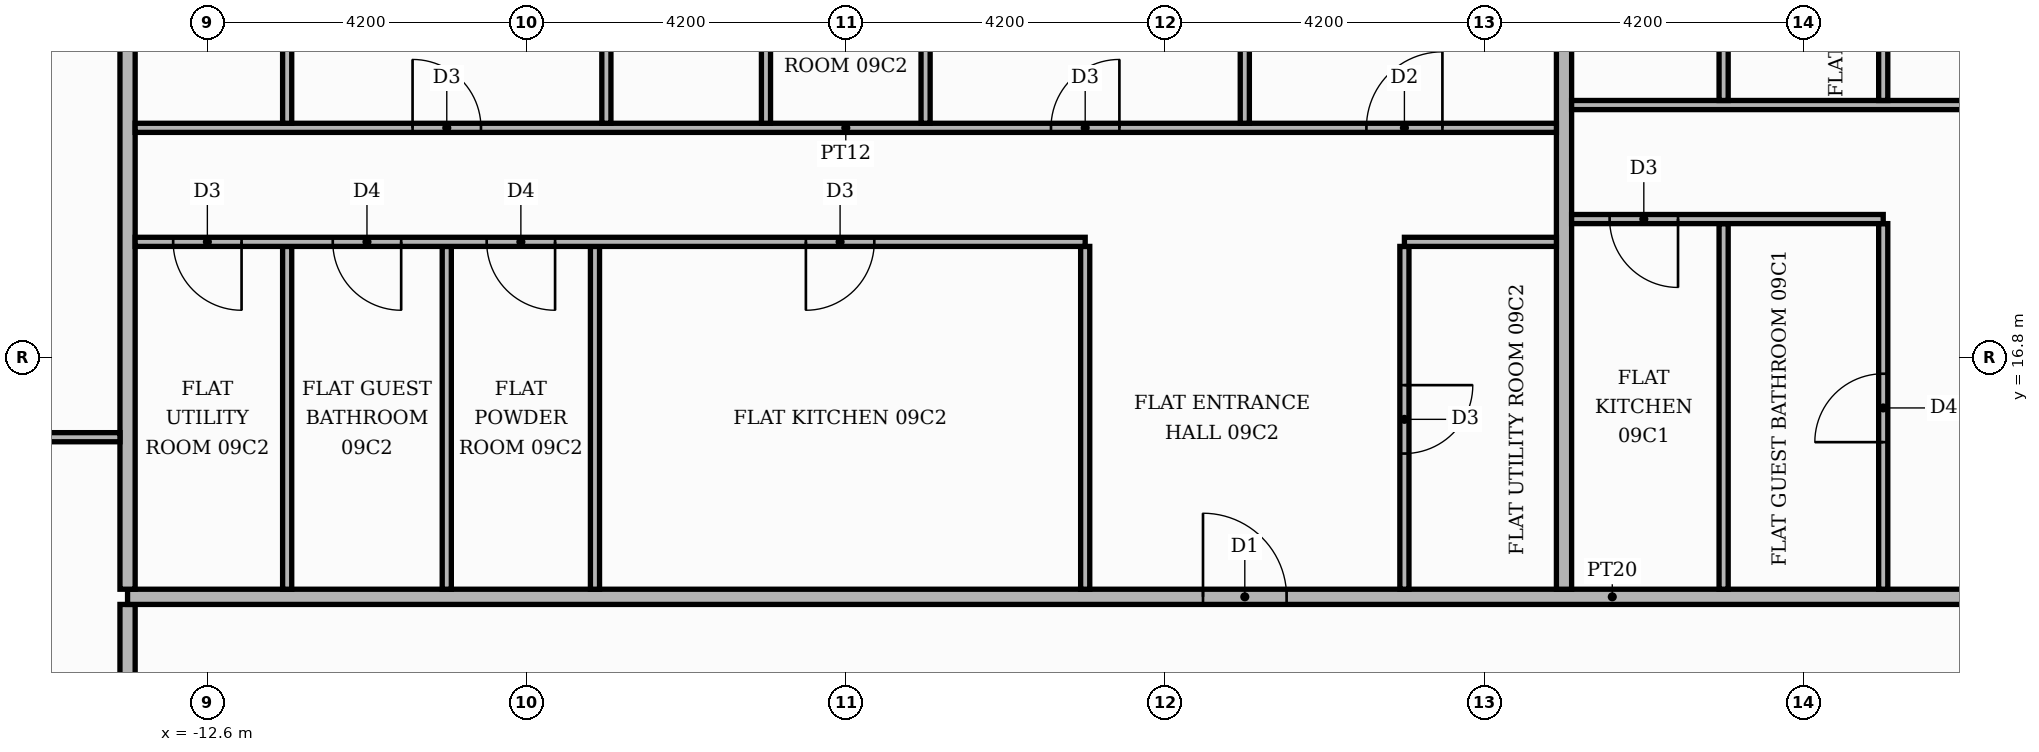
"""IFC4 building model, lengths in metres.
Left out: names, types, materials, properties, quantities, classifications, styles, units other than length and angle.
Written with IfcOpenShell. Run it as: python <this file> out.ifc"""

import sys

from ifc_helpers import new_model, si_unit, direction, frame, frame_2d, origin, place, context, subcontext, project, spatial, rectangle, extrude, element, fill, save


model = new_model("IFC4")
c1 = context("Model", 3, precision=1e-05, world=origin(), true_north=direction((0.0, 1.0)))
c2 = subcontext(c1, "Body", "Model", "MODEL_VIEW")
j1 = project(units=[si_unit("LENGTHUNIT", "METRE"), si_unit("PLANEANGLEUNIT", "RADIAN")], contexts=[c1])
p1 = place(None, origin())
s1 = spatial("IfcSite", under=j1, at=p1, CompositionType="ELEMENT")
p2 = place(p1, origin())
s2 = spatial("IfcBuilding", under=s1, at=p2, CompositionType="ELEMENT")
p3 = place(p2, frame((0.0, 0.0, 42.6)))
s3 = spatial("IfcBuildingStorey", under=s2, at=p3, CompositionType="ELEMENT", Elevation=42.6)
p4 = place(p3, frame((-13.65, -13.55, 0.0), z_axis=(0.0, 0.0, 1.0), x_axis=(0.0, 1.0, 0.0)))
e1 = element("IfcWall", 1, at=p4, inside=s3, PredefinedType="PARTITIONING", context=c2, shape_type="SweptSolid", body=[
    extrude(rectangle(XDim=27.1, YDim=0.2, at=frame_2d((13.55, 0.0))), origin(), (0.0, 0.0, 1.0), 3.48),
])
p5 = place(p4, frame((24.55, 0.0, 0.0)))
e2 = element("IfcOpeningElement", 2, at=p5, cuts=e1, PredefinedType="OPENING", context=c2, shape_type="SweptSolid", body=[
    extrude(rectangle(XDim=1.1, YDim=2.4, at=frame_2d((0.55, 1.2))), frame((0.0, 0.11, 0.0), z_axis=(0.0, -1.0, 0.0), x_axis=(1.0, 0.0, 0.0)), (0.0, 0.0, 1.0), 0.22),
])
p6 = place(p3, frame((-13.65, 13.65, 0.0), z_axis=(0.0, 0.0, 1.0), x_axis=(1.0, 0.0, 0.0)))
e3 = element("IfcWall", 3, at=p6, inside=s3, PredefinedType="PARTITIONING", context=c2, shape_type="SweptSolid", body=[
    extrude(rectangle(XDim=39.07, YDim=0.2, at=frame_2d((19.535, 0.0))), origin(), (0.0, 0.0, 1.0), 3.48),
])
p7 = place(p6, frame((24.65, 0.0, 0.0)))
e4 = element("IfcOpeningElement", 4, at=p7, cuts=e3, PredefinedType="OPENING", context=c2, shape_type="SweptSolid", body=[
    extrude(rectangle(XDim=1.1, YDim=2.4, at=frame_2d((0.55, 1.2))), frame((0.0, 0.11, 0.0), z_axis=(0.0, -1.0, 0.0), x_axis=(1.0, 0.0, 0.0)), (0.0, 0.0, 1.0), 0.22),
])
p8 = place(p6, frame((14.15, 0.0, 0.0)))
e5 = element("IfcOpeningElement", 5, at=p8, cuts=e3, PredefinedType="OPENING", context=c2, shape_type="SweptSolid", body=[
    extrude(rectangle(XDim=1.1, YDim=2.4, at=frame_2d((0.55, 1.2))), frame((0.0, 0.11, 0.0), z_axis=(0.0, -1.0, 0.0), x_axis=(1.0, 0.0, 0.0)), (0.0, 0.0, 1.0), 0.22),
])
p9 = place(p3, frame((-13.65, 13.75, 0.0), z_axis=(0.0, 0.0, 1.0), x_axis=(0.0, 1.0, 0.0)))
e6 = element("IfcWall", 6, at=p9, inside=s3, PredefinedType="PARTITIONING", context=c2, shape_type="SweptSolid", body=[
    extrude(rectangle(XDim=11.67, YDim=0.2, at=frame_2d((5.835, 0.0))), origin(), (0.0, 0.0, 1.0), 3.48),
])
for number, where, z_axis, x_axis in (
    (7, (-11.55, 13.75, 0.0), (0.0, 0.0, 1.0), (0.0, 1.0, 0.0)),
    (8, (-9.45, 13.75, 0.0), (0.0, 0.0, 1.0), (0.0, 1.0, 0.0)),
    (9, (-7.5, 13.75, 0.0), (0.0, 0.0, 1.0), (0.0, 1.0, 0.0)),
    (10, (-1.05, 13.75, 0.0), (0.0, 0.0, 1.0), (0.0, 1.0, 0.0)),
):
    element("IfcWall", number, at=place(p3, frame(where, z_axis=z_axis, x_axis=x_axis)), inside=s3, PredefinedType="PARTITIONING", context=c2, shape_type="SweptSolid", body=[
        extrude(rectangle(XDim=4.51, YDim=0.12, at=frame_2d((2.255, 0.0))), origin(), (0.0, 0.0, 1.0), 3.48),
    ])
p10 = place(p3, frame((3.15, 13.75, 0.0), z_axis=(0.0, 0.0, 1.0), x_axis=(0.0, 1.0, 0.0)))
e11 = element("IfcWall", 11, at=p10, inside=s3, PredefinedType="PARTITIONING", context=c2, shape_type="SweptSolid", body=[
    extrude(rectangle(XDim=4.51, YDim=0.12, at=frame_2d((2.255, 0.0))), origin(), (0.0, 0.0, 1.0), 3.48),
])
p11 = place(p10, frame((1.785, 0.0, 0.0)))
e12 = element("IfcOpeningElement", 12, at=p11, cuts=e11, PredefinedType="OPENING", context=c2, shape_type="SweptSolid", body=[
    extrude(rectangle(XDim=0.9, YDim=2.1, at=frame_2d((0.45, 1.05))), frame((0.0, 0.07, 0.0), z_axis=(0.0, -1.0, 0.0), x_axis=(1.0, 0.0, 0.0)), (0.0, 0.0, 1.0), 0.14),
])
p12 = place(p3, frame((5.25, 13.75, 0.0), z_axis=(0.0, 0.0, 1.0), x_axis=(0.0, 1.0, 0.0)))
e13 = element("IfcWall", 13, at=p12, inside=s3, PredefinedType="PARTITIONING", context=c2, shape_type="SweptSolid", body=[
    extrude(rectangle(XDim=11.67, YDim=0.2, at=frame_2d((5.835, 0.0))), origin(), (0.0, 0.0, 1.0), 3.48),
])
p13 = place(p3, frame((7.35, 13.75, 0.0), z_axis=(0.0, 0.0, 1.0), x_axis=(0.0, 1.0, 0.0)))
e14 = element("IfcWall", 14, at=p13, inside=s3, PredefinedType="PARTITIONING", context=c2, shape_type="SweptSolid", body=[
    extrude(rectangle(XDim=4.81, YDim=0.12, at=frame_2d((2.405, 0.0))), origin(), (0.0, 0.0, 1.0), 3.48),
])
p14 = place(p3, frame((9.45, 13.75, 0.0), z_axis=(0.0, 0.0, 1.0), x_axis=(0.0, 1.0, 0.0)))
e15 = element("IfcWall", 15, at=p14, inside=s3, PredefinedType="PARTITIONING", context=c2, shape_type="SweptSolid", body=[
    extrude(rectangle(XDim=4.81, YDim=0.12, at=frame_2d((2.405, 0.0))), origin(), (0.0, 0.0, 1.0), 3.48),
])
p15 = place(p14, frame((1.935, 0.0, 0.0)))
e16 = element("IfcOpeningElement", 16, at=p15, cuts=e15, PredefinedType="OPENING", context=c2, shape_type="SweptSolid", body=[
    extrude(rectangle(XDim=0.9, YDim=2.1, at=frame_2d((0.45, 1.05))), frame((0.0, 0.07, 0.0), z_axis=(0.0, -1.0, 0.0), x_axis=(1.0, 0.0, 0.0)), (0.0, 0.0, 1.0), 0.14),
])
p16 = place(p3, frame((-20.72, 15.75, 0.0), z_axis=(0.0, 0.0, 1.0), x_axis=(1.0, 0.0, 0.0)))
e17 = element("IfcWall", 17, at=p16, inside=s3, PredefinedType="PARTITIONING", context=c2, shape_type="SweptSolid", body=[
    extrude(rectangle(XDim=6.97, YDim=0.12, at=frame_2d((3.485, 0.0))), origin(), (0.0, 0.0, 1.0), 3.48),
])
p17 = place(p16, frame((3.085, 0.0, 0.0)))
e18 = element("IfcOpeningElement", 18, at=p17, cuts=e17, PredefinedType="OPENING", context=c2, shape_type="SweptSolid", body=[
    extrude(rectangle(XDim=0.9, YDim=2.1, at=frame_2d((0.45, 1.05))), frame((0.0, 0.07, 0.0), z_axis=(0.0, -1.0, 0.0), x_axis=(1.0, 0.0, 0.0)), (0.0, 0.0, 1.0), 0.14),
])
p18 = place(p3, frame((-13.55, 18.32, 0.0), z_axis=(0.0, 0.0, 1.0), x_axis=(1.0, 0.0, 0.0)))
e19 = element("IfcWall", 19, at=p18, inside=s3, PredefinedType="PARTITIONING", context=c2, shape_type="SweptSolid", body=[
    extrude(rectangle(XDim=12.5, YDim=0.12, at=frame_2d((6.25, 0.0))), origin(), (0.0, 0.0, 1.0), 3.48),
])
p19 = place(p18, frame((8.825, 0.0, 0.0)))
e20 = element("IfcOpeningElement", 20, at=p19, cuts=e19, PredefinedType="OPENING", context=c2, shape_type="SweptSolid", body=[
    extrude(rectangle(XDim=0.9, YDim=2.1, at=frame_2d((0.45, 1.05))), frame((0.0, 0.07, 0.0), z_axis=(0.0, -1.0, 0.0), x_axis=(1.0, 0.0, 0.0)), (0.0, 0.0, 1.0), 0.14),
])
p20 = place(p18, frame((4.625, 0.0, 0.0)))
e21 = element("IfcOpeningElement", 21, at=p20, cuts=e19, PredefinedType="OPENING", context=c2, shape_type="SweptSolid", body=[
    extrude(rectangle(XDim=0.9, YDim=2.1, at=frame_2d((0.45, 1.05))), frame((0.0, 0.07, 0.0), z_axis=(0.0, -1.0, 0.0), x_axis=(1.0, 0.0, 0.0)), (0.0, 0.0, 1.0), 0.14),
])
p21 = place(p18, frame((2.6, 0.0, 0.0)))
e22 = element("IfcOpeningElement", 22, at=p21, cuts=e19, PredefinedType="OPENING", context=c2, shape_type="SweptSolid", body=[
    extrude(rectangle(XDim=0.9, YDim=2.1, at=frame_2d((0.45, 1.05))), frame((0.0, 0.07, 0.0), z_axis=(0.0, -1.0, 0.0), x_axis=(1.0, 0.0, 0.0)), (0.0, 0.0, 1.0), 0.14),
])
p22 = place(p18, frame((0.5, 0.0, 0.0)))
e23 = element("IfcOpeningElement", 23, at=p22, cuts=e19, PredefinedType="OPENING", context=c2, shape_type="SweptSolid", body=[
    extrude(rectangle(XDim=0.9, YDim=2.1, at=frame_2d((0.45, 1.05))), frame((0.0, 0.07, 0.0), z_axis=(0.0, -1.0, 0.0), x_axis=(1.0, 0.0, 0.0)), (0.0, 0.0, 1.0), 0.14),
])
p23 = place(p3, frame((3.15, 18.32, 0.0), z_axis=(0.0, 0.0, 1.0), x_axis=(1.0, 0.0, 0.0)))
e24 = element("IfcWall", 24, at=p23, inside=s3, PredefinedType="PARTITIONING", context=c2, shape_type="SweptSolid", body=[
    extrude(rectangle(XDim=2.0, YDim=0.12, at=frame_2d((1.0, 0.0))), origin(), (0.0, 0.0, 1.0), 3.48),
])
p24 = place(p3, frame((5.35, 18.62, 0.0), z_axis=(0.0, 0.0, 1.0), x_axis=(1.0, 0.0, 0.0)))
e25 = element("IfcWall", 25, at=p24, inside=s3, PredefinedType="PARTITIONING", context=c2, shape_type="SweptSolid", body=[
    extrude(rectangle(XDim=4.1, YDim=0.12, at=frame_2d((2.05, 0.0))), origin(), (0.0, 0.0, 1.0), 3.48),
])
p25 = place(p24, frame((0.5, 0.0, 0.0)))
e26 = element("IfcOpeningElement", 26, at=p25, cuts=e25, PredefinedType="OPENING", context=c2, shape_type="SweptSolid", body=[
    extrude(rectangle(XDim=0.9, YDim=2.1, at=frame_2d((0.45, 1.05))), frame((0.0, 0.07, 0.0), z_axis=(0.0, -1.0, 0.0), x_axis=(1.0, 0.0, 0.0)), (0.0, 0.0, 1.0), 0.14),
])
p26 = place(p3, frame((-13.55, 19.82, 0.0), z_axis=(0.0, 0.0, 1.0), x_axis=(1.0, 0.0, 0.0)))
e27 = element("IfcWall", 27, at=p26, inside=s3, PredefinedType="PARTITIONING", context=c2, shape_type="SweptSolid", body=[
    extrude(rectangle(XDim=18.7, YDim=0.12, at=frame_2d((9.35, 0.0))), origin(), (0.0, 0.0, 1.0), 3.48),
])
p27 = place(p26, frame((16.2, 0.0, 0.0)))
e28 = element("IfcOpeningElement", 28, at=p27, cuts=e27, PredefinedType="OPENING", context=c2, shape_type="SweptSolid", body=[
    extrude(rectangle(XDim=1.0, YDim=2.1, at=frame_2d((0.5, 1.05))), frame((0.0, 0.07, 0.0), z_axis=(0.0, -1.0, 0.0), x_axis=(1.0, 0.0, 0.0)), (0.0, 0.0, 1.0), 0.14),
])
p28 = place(p26, frame((12.05, 0.0, 0.0)))
e29 = element("IfcOpeningElement", 29, at=p28, cuts=e27, PredefinedType="OPENING", context=c2, shape_type="SweptSolid", body=[
    extrude(rectangle(XDim=0.9, YDim=2.1, at=frame_2d((0.45, 1.05))), frame((0.0, 0.07, 0.0), z_axis=(0.0, -1.0, 0.0), x_axis=(1.0, 0.0, 0.0)), (0.0, 0.0, 1.0), 0.14),
])
p29 = place(p26, frame((3.65, 0.0, 0.0)))
e30 = element("IfcOpeningElement", 30, at=p29, cuts=e27, PredefinedType="OPENING", context=c2, shape_type="SweptSolid", body=[
    extrude(rectangle(XDim=0.9, YDim=2.1, at=frame_2d((0.45, 1.05))), frame((0.0, 0.07, 0.0), z_axis=(0.0, -1.0, 0.0), x_axis=(1.0, 0.0, 0.0)), (0.0, 0.0, 1.0), 0.14),
])
p30 = place(p3, frame((-11.55, 19.88, 0.0), z_axis=(0.0, 0.0, 1.0), x_axis=(0.0, 1.0, 0.0)))
e31 = element("IfcWall", 31, at=p30, inside=s3, PredefinedType="PARTITIONING", context=c2, shape_type="SweptSolid", body=[
    extrude(rectangle(XDim=5.54, YDim=0.12, at=frame_2d((2.77, 0.0))), origin(), (0.0, 0.0, 1.0), 3.48),
])
p31 = place(p30, frame((2.44, 0.0, 0.0)))
e32 = element("IfcOpeningElement", 32, at=p31, cuts=e31, PredefinedType="OPENING", context=c2, shape_type="SweptSolid", body=[
    extrude(rectangle(XDim=0.9, YDim=2.1, at=frame_2d((0.45, 1.05))), frame((0.0, 0.07, 0.0), z_axis=(0.0, -1.0, 0.0), x_axis=(1.0, 0.0, 0.0)), (0.0, 0.0, 1.0), 0.14),
])
p32 = place(p3, frame((-7.35, 19.88, 0.0), z_axis=(0.0, 0.0, 1.0), x_axis=(0.0, 1.0, 0.0)))
e33 = element("IfcWall", 33, at=p32, inside=s3, PredefinedType="PARTITIONING", context=c2, shape_type="SweptSolid", body=[
    extrude(rectangle(XDim=5.54, YDim=0.12, at=frame_2d((2.77, 0.0))), origin(), (0.0, 0.0, 1.0), 3.48),
])
p33 = place(p3, frame((-5.25, 19.88, 0.0), z_axis=(0.0, 0.0, 1.0), x_axis=(0.0, 1.0, 0.0)))
e34 = element("IfcWall", 34, at=p33, inside=s3, PredefinedType="PARTITIONING", context=c2, shape_type="SweptSolid", body=[
    extrude(rectangle(XDim=5.54, YDim=0.12, at=frame_2d((2.77, 0.0))), origin(), (0.0, 0.0, 1.0), 3.48),
])
p34 = place(p33, frame((2.44, 0.0, 0.0)))
e35 = element("IfcOpeningElement", 35, at=p34, cuts=e34, PredefinedType="OPENING", context=c2, shape_type="SweptSolid", body=[
    extrude(rectangle(XDim=0.9, YDim=2.1, at=frame_2d((0.45, 1.05))), frame((0.0, 0.07, 0.0), z_axis=(0.0, -1.0, 0.0), x_axis=(1.0, 0.0, 0.0)), (0.0, 0.0, 1.0), 0.14),
])
p35 = place(p3, frame((-3.15, 19.88, 0.0), z_axis=(0.0, 0.0, 1.0), x_axis=(0.0, 1.0, 0.0)))
e36 = element("IfcWall", 36, at=p35, inside=s3, PredefinedType="PARTITIONING", context=c2, shape_type="SweptSolid", body=[
    extrude(rectangle(XDim=5.54, YDim=0.12, at=frame_2d((2.77, 0.0))), origin(), (0.0, 0.0, 1.0), 3.48),
])
p36 = place(p35, frame((2.44, 0.0, 0.0)))
e37 = element("IfcOpeningElement", 37, at=p36, cuts=e36, PredefinedType="OPENING", context=c2, shape_type="SweptSolid", body=[
    extrude(rectangle(XDim=0.9, YDim=2.1, at=frame_2d((0.45, 1.05))), frame((0.0, 0.07, 0.0), z_axis=(0.0, -1.0, 0.0), x_axis=(1.0, 0.0, 0.0)), (0.0, 0.0, 1.0), 0.14),
])
p37 = place(p3, frame((1.05, 19.88, 0.0), z_axis=(0.0, 0.0, 1.0), x_axis=(0.0, 1.0, 0.0)))
e38 = element("IfcWall", 38, at=p37, inside=s3, PredefinedType="PARTITIONING", context=c2, shape_type="SweptSolid", body=[
    extrude(rectangle(XDim=5.54, YDim=0.12, at=frame_2d((2.77, 0.0))), origin(), (0.0, 0.0, 1.0), 3.48),
])
p38 = place(p3, frame((5.35, 20.12, 0.0), z_axis=(0.0, 0.0, 1.0), x_axis=(1.0, 0.0, 0.0)))
e39 = element("IfcWall", 39, at=p38, inside=s3, PredefinedType="PARTITIONING", context=c2, shape_type="SweptSolid", body=[
    extrude(rectangle(XDim=11.95, YDim=0.12, at=frame_2d((5.975, 0.0))), origin(), (0.0, 0.0, 1.0), 3.48),
])
p39 = place(p38, frame((8.85, 0.0, 0.0)))
e40 = element("IfcOpeningElement", 40, at=p39, cuts=e39, PredefinedType="OPENING", context=c2, shape_type="SweptSolid", body=[
    extrude(rectangle(XDim=1.0, YDim=2.1, at=frame_2d((0.5, 1.05))), frame((0.0, 0.07, 0.0), z_axis=(0.0, -1.0, 0.0), x_axis=(1.0, 0.0, 0.0)), (0.0, 0.0, 1.0), 0.14),
])
p40 = place(p38, frame((5.75, 0.0, 0.0)))
e41 = element("IfcOpeningElement", 41, at=p40, cuts=e39, PredefinedType="OPENING", context=c2, shape_type="SweptSolid", body=[
    extrude(rectangle(XDim=0.9, YDim=2.1, at=frame_2d((0.45, 1.05))), frame((0.0, 0.07, 0.0), z_axis=(0.0, -1.0, 0.0), x_axis=(1.0, 0.0, 0.0)), (0.0, 0.0, 1.0), 0.14),
])
p41 = place(p3, frame((7.35, 20.18, 0.0), z_axis=(0.0, 0.0, 1.0), x_axis=(0.0, 1.0, 0.0)))
e42 = element("IfcWall", 42, at=p41, inside=s3, PredefinedType="PARTITIONING", context=c2, shape_type="SweptSolid", body=[
    extrude(rectangle(XDim=5.24, YDim=0.12, at=frame_2d((2.62, 0.0))), origin(), (0.0, 0.0, 1.0), 3.48),
])
p42 = place(p41, frame((2.29, 0.0, 0.0)))
e43 = element("IfcOpeningElement", 43, at=p42, cuts=e42, PredefinedType="OPENING", context=c2, shape_type="SweptSolid", body=[
    extrude(rectangle(XDim=0.9, YDim=2.1, at=frame_2d((0.45, 1.05))), frame((0.0, 0.07, 0.0), z_axis=(0.0, -1.0, 0.0), x_axis=(1.0, 0.0, 0.0)), (0.0, 0.0, 1.0), 0.14),
])
p43 = place(p3, frame((9.45, 20.18, 0.0), z_axis=(0.0, 0.0, 1.0), x_axis=(0.0, 1.0, 0.0)))
e44 = element("IfcWall", 44, at=p43, inside=s3, PredefinedType="PARTITIONING", context=c2, shape_type="SweptSolid", body=[
    extrude(rectangle(XDim=5.24, YDim=0.12, at=frame_2d((2.62, 0.0))), origin(), (0.0, 0.0, 1.0), 3.48),
])
p44 = place(p43, frame((2.29, 0.0, 0.0)))
e45 = element("IfcOpeningElement", 45, at=p44, cuts=e44, PredefinedType="OPENING", context=c2, shape_type="SweptSolid", body=[
    extrude(rectangle(XDim=0.9, YDim=2.1, at=frame_2d((0.45, 1.05))), frame((0.0, 0.07, 0.0), z_axis=(0.0, -1.0, 0.0), x_axis=(1.0, 0.0, 0.0)), (0.0, 0.0, 1.0), 0.14),
])
p45 = place(p15, origin())
e46 = element("IfcDoor", 46, at=p45, inside=s3, OperationType="SINGLE_SWING_LEFT", PredefinedType="DOOR", context=c2, shape_type="SweptSolid", body=[
    extrude(rectangle(XDim=0.9, YDim=2.1, at=frame_2d((0.45, 1.05))), frame((0.0, 0.025, 0.0), z_axis=(0.0, -1.0, 0.0), x_axis=(1.0, 0.0, 0.0)), (0.0, 0.0, 1.0), 0.05),
])
fill(e16, e46)
p46 = place(p25, frame((0.9, 0.0, 0.0), z_axis=(0.0, 0.0, 1.0), x_axis=(-1.0, 0.0, 0.0)))
e47 = element("IfcDoor", 47, at=p46, inside=s3, OperationType="SINGLE_SWING_RIGHT", PredefinedType="DOOR", context=c2, shape_type="SweptSolid", body=[
    extrude(rectangle(XDim=0.9, YDim=2.1, at=frame_2d((0.45, 1.05))), frame((0.0, 0.025, 0.0), z_axis=(0.0, -1.0, 0.0), x_axis=(1.0, 0.0, 0.0)), (0.0, 0.0, 1.0), 0.05),
])
fill(e26, e47)
p47 = place(p8, origin())
e48 = element("IfcDoor", 48, at=p47, inside=s3, OperationType="SINGLE_SWING_LEFT", PredefinedType="DOOR", context=c2, shape_type="SweptSolid", body=[
    extrude(rectangle(XDim=1.1, YDim=2.4, at=frame_2d((0.55, 1.2))), frame((0.0, 0.025, 0.0), z_axis=(0.0, -1.0, 0.0), x_axis=(1.0, 0.0, 0.0)), (0.0, 0.0, 1.0), 0.05),
])
fill(e5, e48)
p48 = place(p11, frame((0.9, 0.0, 0.0), z_axis=(0.0, 0.0, 1.0), x_axis=(-1.0, 0.0, 0.0)))
e49 = element("IfcDoor", 49, at=p48, inside=s3, OperationType="SINGLE_SWING_RIGHT", PredefinedType="DOOR", context=c2, shape_type="SweptSolid", body=[
    extrude(rectangle(XDim=0.9, YDim=2.1, at=frame_2d((0.45, 1.05))), frame((0.0, 0.025, 0.0), z_axis=(0.0, -1.0, 0.0), x_axis=(1.0, 0.0, 0.0)), (0.0, 0.0, 1.0), 0.05),
])
fill(e12, e49)
p49 = place(p19, frame((0.9, 0.0, 0.0), z_axis=(0.0, 0.0, 1.0), x_axis=(-1.0, 0.0, 0.0)))
e50 = element("IfcDoor", 50, at=p49, inside=s3, OperationType="SINGLE_SWING_LEFT", PredefinedType="DOOR", context=c2, shape_type="SweptSolid", body=[
    extrude(rectangle(XDim=0.9, YDim=2.1, at=frame_2d((0.45, 1.05))), frame((0.0, 0.025, 0.0), z_axis=(0.0, -1.0, 0.0), x_axis=(1.0, 0.0, 0.0)), (0.0, 0.0, 1.0), 0.05),
])
fill(e20, e50)
p50 = place(p20, frame((0.9, 0.0, 0.0), z_axis=(0.0, 0.0, 1.0), x_axis=(-1.0, 0.0, 0.0)))
e51 = element("IfcDoor", 51, at=p50, inside=s3, OperationType="SINGLE_SWING_RIGHT", PredefinedType="DOOR", context=c2, shape_type="SweptSolid", body=[
    extrude(rectangle(XDim=0.9, YDim=2.1, at=frame_2d((0.45, 1.05))), frame((0.0, 0.025, 0.0), z_axis=(0.0, -1.0, 0.0), x_axis=(1.0, 0.0, 0.0)), (0.0, 0.0, 1.0), 0.05),
])
fill(e21, e51)
p51 = place(p21, frame((0.9, 0.0, 0.0), z_axis=(0.0, 0.0, 1.0), x_axis=(-1.0, 0.0, 0.0)))
e52 = element("IfcDoor", 52, at=p51, inside=s3, OperationType="SINGLE_SWING_RIGHT", PredefinedType="DOOR", context=c2, shape_type="SweptSolid", body=[
    extrude(rectangle(XDim=0.9, YDim=2.1, at=frame_2d((0.45, 1.05))), frame((0.0, 0.025, 0.0), z_axis=(0.0, -1.0, 0.0), x_axis=(1.0, 0.0, 0.0)), (0.0, 0.0, 1.0), 0.05),
])
fill(e22, e52)
p52 = place(p22, frame((0.9, 0.0, 0.0), z_axis=(0.0, 0.0, 1.0), x_axis=(-1.0, 0.0, 0.0)))
e53 = element("IfcDoor", 53, at=p52, inside=s3, OperationType="SINGLE_SWING_RIGHT", PredefinedType="DOOR", context=c2, shape_type="SweptSolid", body=[
    extrude(rectangle(XDim=0.9, YDim=2.1, at=frame_2d((0.45, 1.05))), frame((0.0, 0.025, 0.0), z_axis=(0.0, -1.0, 0.0), x_axis=(1.0, 0.0, 0.0)), (0.0, 0.0, 1.0), 0.05),
])
fill(e23, e53)
p53 = place(p27, origin())
e54 = element("IfcDoor", 54, at=p53, inside=s3, OperationType="SINGLE_SWING_RIGHT", PredefinedType="DOOR", context=c2, shape_type="SweptSolid", body=[
    extrude(rectangle(XDim=1.0, YDim=2.1, at=frame_2d((0.5, 1.05))), frame((0.0, 0.025, 0.0), z_axis=(0.0, -1.0, 0.0), x_axis=(1.0, 0.0, 0.0)), (0.0, 0.0, 1.0), 0.05),
])
fill(e28, e54)
p54 = place(p28, origin())
e55 = element("IfcDoor", 55, at=p54, inside=s3, OperationType="SINGLE_SWING_RIGHT", PredefinedType="DOOR", context=c2, shape_type="SweptSolid", body=[
    extrude(rectangle(XDim=0.9, YDim=2.1, at=frame_2d((0.45, 1.05))), frame((0.0, 0.025, 0.0), z_axis=(0.0, -1.0, 0.0), x_axis=(1.0, 0.0, 0.0)), (0.0, 0.0, 1.0), 0.05),
])
fill(e29, e55)
p55 = place(p29, origin())
e56 = element("IfcDoor", 56, at=p55, inside=s3, OperationType="SINGLE_SWING_LEFT", PredefinedType="DOOR", context=c2, shape_type="SweptSolid", body=[
    extrude(rectangle(XDim=0.9, YDim=2.1, at=frame_2d((0.45, 1.05))), frame((0.0, 0.025, 0.0), z_axis=(0.0, -1.0, 0.0), x_axis=(1.0, 0.0, 0.0)), (0.0, 0.0, 1.0), 0.05),
])
fill(e30, e56)
save(model, sys.argv[1])
